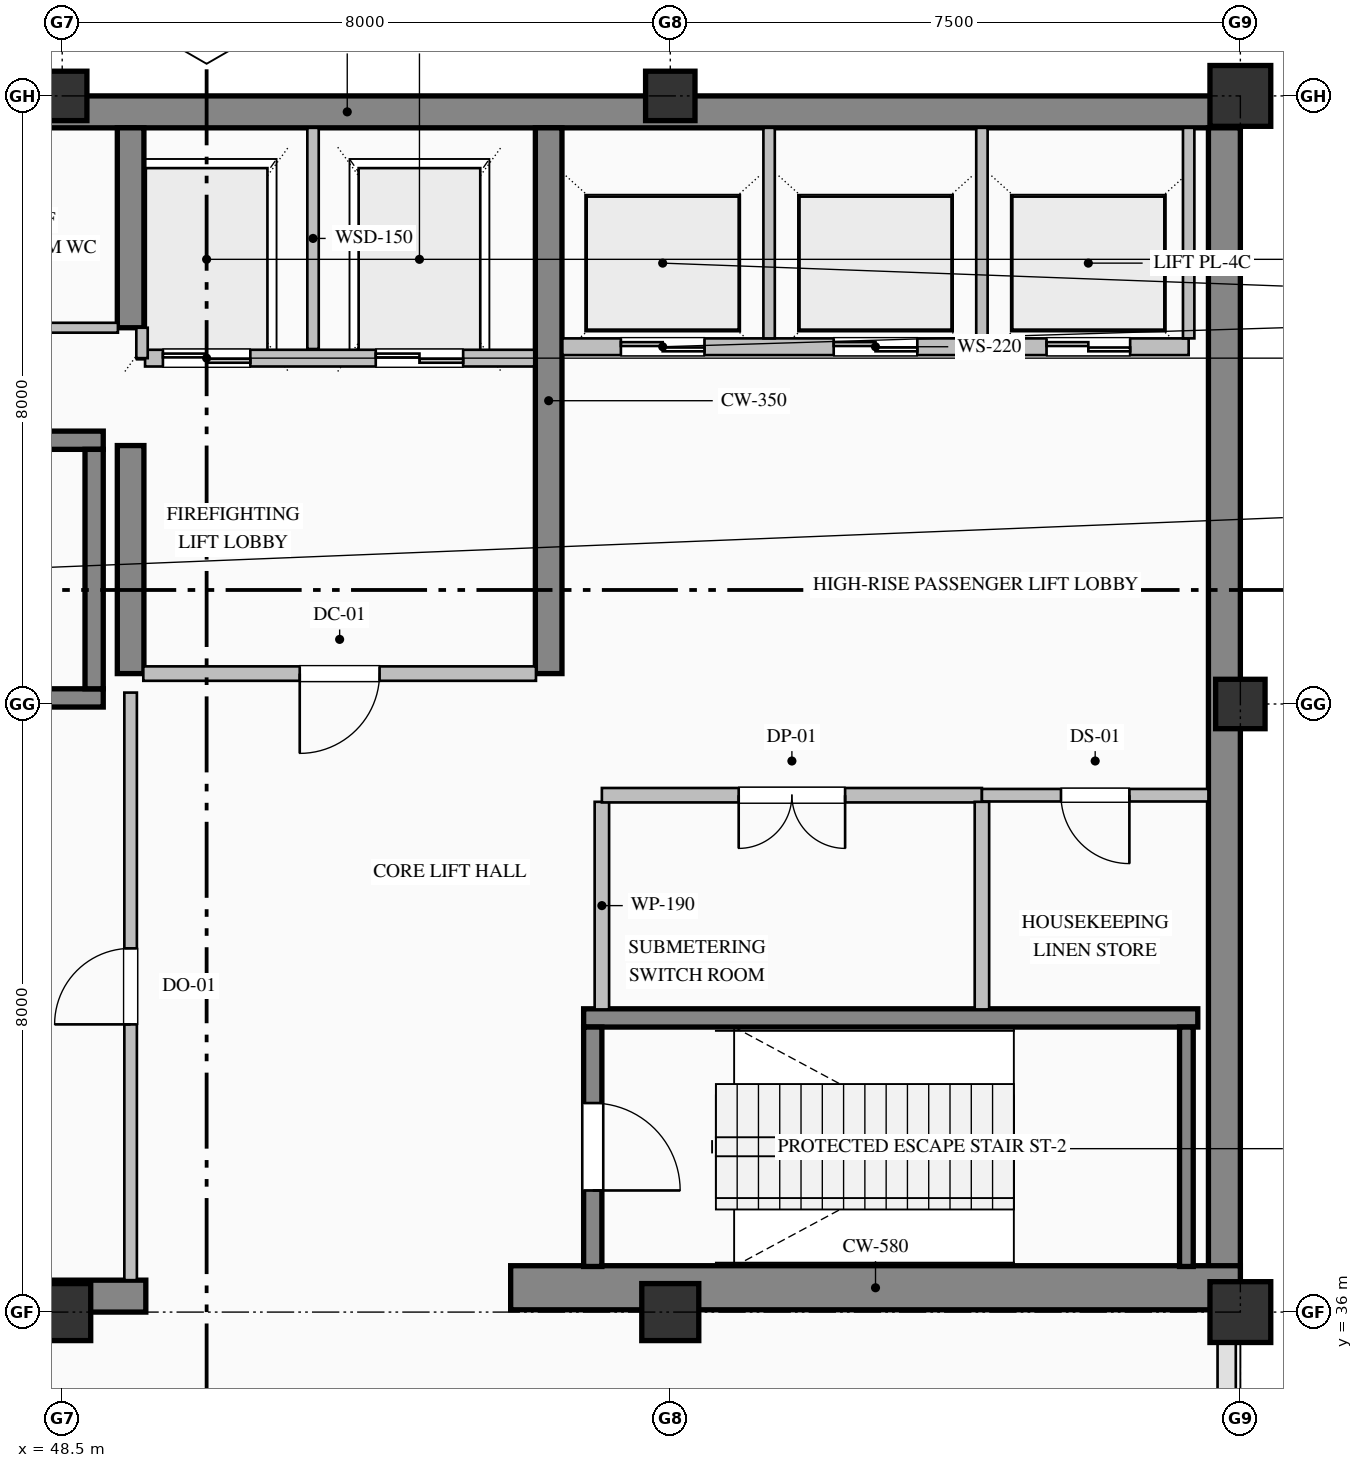
"""IFC4 building model, lengths in metres.
Left out: names, types, materials, properties, quantities, classifications, styles, units other than length and angle.
Written with IfcOpenShell. Run it as: python <this file> out.ifc"""

import sys

from ifc_helpers import new_model, si_unit, direction, frame, frame_2d, origin, origin_2d, place, context, subcontext, project, spatial, rectangle, hollow_rectangle, extrude, element, fill, save


model = new_model("IFC4")
c1 = context("Model", 3, precision=1e-05, world=origin(), true_north=direction((0.0, 1.0)))
c2 = subcontext(c1, "Body", "Model", "MODEL_VIEW")
j1 = project(units=[si_unit("LENGTHUNIT", "METRE"), si_unit("PLANEANGLEUNIT", "RADIAN")], contexts=[c1])
p1 = place(None, origin())
s1 = spatial("IfcSite", under=j1, at=p1, CompositionType="ELEMENT")
p2 = place(p1, origin())
s2 = spatial("IfcBuilding", under=s1, at=p2, CompositionType="ELEMENT")
p3 = place(p2, frame((0.0, 0.0, 378.4)))
s3 = spatial("IfcBuildingStorey", under=s2, at=p3, CompositionType="ELEMENT", Elevation=378.4)
p4 = place(p3, frame((40.5, 51.79, 0.0), z_axis=(0.0, 0.0, 1.0), x_axis=(1.0, 0.0, 0.0)))
e1 = element("IfcWall", 1, at=p4, inside=s3, PredefinedType="SHEAR", context=c2, shape_type="SweptSolid", body=[
    extrude(rectangle(XDim=23.5, YDim=0.42, at=frame_2d((11.75, 0.0))), origin(), (0.0, 0.0, 1.0), 4.95),
])
p5 = place(p3, frame((63.79, 36.32, 0.0), z_axis=(0.0, 0.0, 1.0), x_axis=(0.0, 1.0, 0.0)))
e2 = element("IfcWall", 2, at=p5, inside=s3, PredefinedType="SHEAR", context=c2, shape_type="SweptSolid", body=[
    extrude(rectangle(XDim=15.26, YDim=0.42, at=frame_2d((7.63, 0.0))), origin(), (0.0, 0.0, 1.0), 4.95),
])
p6 = place(p3, frame((40.5, 36.21, 0.0), z_axis=(0.0, 0.0, 1.0), x_axis=(1.0, 0.0, 0.0)))
e3 = element("IfcWall", 3, at=p6, inside=s3, PredefinedType="SHEAR", context=c2, shape_type="SweptSolid", body=[
    extrude(rectangle(XDim=9.1, YDim=0.42, at=frame_2d((4.55, 0.0))), origin(), (0.0, 0.0, 1.0), 4.95),
])
p7 = place(p3, frame((54.4, 36.32, 0.0), z_axis=(0.0, 0.0, 1.0), x_axis=(1.0, 0.0, 0.0)))
e4 = element("IfcWall", 4, at=p7, inside=s3, PredefinedType="SHEAR", context=c2, shape_type="SweptSolid", body=[
    extrude(rectangle(XDim=9.6, YDim=0.58, at=frame_2d((4.8, 0.0))), origin(), (0.0, 0.0, 1.0), 5.4),
])
p8 = place(p3, frame((49.4, 44.4, 0.0), z_axis=(0.0, 0.0, 1.0), x_axis=(0.0, 1.0, 0.0)))
e5 = element("IfcWall", 5, at=p8, inside=s3, PredefinedType="SHEAR", context=c2, shape_type="SweptSolid", body=[
    extrude(rectangle(XDim=3.0, YDim=0.35, at=frame_2d((1.5, 0.0))), origin(), (0.0, 0.0, 1.0), 4.95),
])
p9 = place(p3, frame((49.4, 48.95, 0.0), z_axis=(0.0, 0.0, 1.0), x_axis=(0.0, 1.0, 0.0)))
e6 = element("IfcWall", 6, at=p9, inside=s3, PredefinedType="SHEAR", context=c2, shape_type="SweptSolid", body=[
    extrude(rectangle(XDim=2.63, YDim=0.35, at=frame_2d((1.315, 0.0))), origin(), (0.0, 0.0, 1.0), 4.95),
])
p10 = place(p3, frame((54.9, 44.4, 0.0), z_axis=(0.0, 0.0, 1.0), x_axis=(0.0, 1.0, 0.0)))
e7 = element("IfcWall", 7, at=p10, inside=s3, PredefinedType="SHEAR", context=c2, shape_type="SweptSolid", body=[
    extrude(rectangle(XDim=7.18, YDim=0.35, at=frame_2d((3.59, 0.0))), origin(), (0.0, 0.0, 1.0), 4.95),
])
p11 = place(p3, frame((48.5, 36.0, 0.0), z_axis=(0.0, 0.0, 1.0), x_axis=(1.0, 0.0, 0.0)))
e8 = element("IfcColumn", 8, at=p11, inside=s3, PredefinedType="COLUMN", context=c2, shape_type="SweptSolid", body=[
    extrude(rectangle(XDim=0.75, YDim=0.75, at=origin_2d()), origin(), (0.0, 0.0, 1.0), 5.4),
])
p12 = place(p3, frame((48.5, 52.0, 0.0), z_axis=(0.0, 0.0, 1.0), x_axis=(1.0, 0.0, 0.0)))
e9 = element("IfcColumn", 9, at=p12, inside=s3, PredefinedType="COLUMN", context=c2, shape_type="SweptSolid", body=[
    extrude(hollow_rectangle(XDim=0.65, YDim=0.65, WallThickness=0.028, at=origin_2d()), origin(), (0.0, 0.0, 1.0), 5.4),
])
p13 = place(p3, frame((56.5, 36.0, 0.0), z_axis=(0.0, 0.0, 1.0), x_axis=(1.0, 0.0, 0.0)))
e10 = element("IfcColumn", 10, at=p13, inside=s3, PredefinedType="COLUMN", context=c2, shape_type="SweptSolid", body=[
    extrude(rectangle(XDim=0.75, YDim=0.75, at=origin_2d()), origin(), (0.0, 0.0, 1.0), 5.4),
])
p14 = place(p3, frame((56.5, 52.0, 0.0), z_axis=(0.0, 0.0, 1.0), x_axis=(1.0, 0.0, 0.0)))
e11 = element("IfcColumn", 11, at=p14, inside=s3, PredefinedType="COLUMN", context=c2, shape_type="SweptSolid", body=[
    extrude(hollow_rectangle(XDim=0.65, YDim=0.65, WallThickness=0.028, at=origin_2d()), origin(), (0.0, 0.0, 1.0), 5.4),
])
p15 = place(p3, frame((64.0, 36.0, 0.0), z_axis=(0.0, 0.0, 1.0), x_axis=(1.0, 0.0, 0.0)))
e12 = element("IfcColumn", 12, at=p15, inside=s3, PredefinedType="COLUMN", context=c2, shape_type="SweptSolid", body=[
    extrude(hollow_rectangle(XDim=0.8, YDim=0.8, WallThickness=0.032, at=origin_2d()), origin(), (0.0, 0.0, 1.0), 5.4),
])
p16 = place(p3, frame((64.0, 44.0, 0.0), z_axis=(0.0, 0.0, 1.0), x_axis=(1.0, 0.0, 0.0)))
e13 = element("IfcColumn", 13, at=p16, inside=s3, PredefinedType="COLUMN", context=c2, shape_type="SweptSolid", body=[
    extrude(hollow_rectangle(XDim=0.65, YDim=0.65, WallThickness=0.028, at=origin_2d()), origin(), (0.0, 0.0, 1.0), 5.4),
])
p17 = place(p3, frame((64.0, 52.0, 0.0), z_axis=(0.0, 0.0, 1.0), x_axis=(1.0, 0.0, 0.0)))
e14 = element("IfcColumn", 14, at=p17, inside=s3, PredefinedType="COLUMN", context=c2, shape_type="SweptSolid", body=[
    extrude(hollow_rectangle(XDim=0.8, YDim=0.8, WallThickness=0.032, at=origin_2d()), origin(), (0.0, 0.0, 1.0), 5.4),
])
for number, where, z_axis, x_axis in (
    (15, (40.96, 47.47, 0.0), (0.0, 0.0, 1.0), (1.0, 0.0, 0.0)),
    (16, (49.04, 44.08, 0.0), (0.0, 0.0, 1.0), (-1.0, 0.0, 0.0)),
):
    element("IfcWall", number, at=place(p3, frame(where, z_axis=z_axis, x_axis=x_axis)), inside=s3, PredefinedType="SOLIDWALL", context=c2, shape_type="SweptSolid", body=[
        extrude(rectangle(XDim=8.08, YDim=0.24, at=frame_2d((4.04, 0.0))), origin(), (0.0, 0.0, 1.0), 5.4),
    ])
p18 = place(p3, frame((48.92, 44.2, 0.0), z_axis=(0.0, 0.0, 1.0), x_axis=(0.0, 1.0, 0.0)))
e17 = element("IfcWall", 17, at=p18, inside=s3, PredefinedType="SOLIDWALL", context=c2, shape_type="SweptSolid", body=[
    extrude(rectangle(XDim=3.15, YDim=0.24, at=frame_2d((1.575, 0.0))), origin(), (0.0, 0.0, 1.0), 5.4),
])
p19 = place(p3, frame((55.36, 39.87, 0.0), z_axis=(0.0, 0.0, 1.0), x_axis=(1.0, 0.0, 0.0)))
e18 = element("IfcWall", 18, at=p19, inside=s3, PredefinedType="SOLIDWALL", context=c2, shape_type="SweptSolid", body=[
    extrude(rectangle(XDim=8.08, YDim=0.24, at=frame_2d((4.04, 0.0))), origin(), (0.0, 0.0, 1.0), 5.4),
])
p20 = place(p3, frame((55.48, 39.75, 0.0), z_axis=(0.0, 0.0, 1.0), x_axis=(0.0, -1.0, 0.0)))
e19 = element("IfcWall", 19, at=p20, inside=s3, PredefinedType="SOLIDWALL", context=c2, shape_type="SweptSolid", body=[
    extrude(rectangle(XDim=3.15, YDim=0.24, at=frame_2d((1.575, 0.0))), origin(), (0.0, 0.0, 1.0), 5.4),
])
p21 = place(p20, frame((1.0, 0.0, 0.0)))
e20 = element("IfcOpeningElement", 20, at=p21, cuts=e19, PredefinedType="OPENING", context=c2, shape_type="SweptSolid", body=[
    extrude(rectangle(XDim=1.15, YDim=2.2, at=frame_2d((0.575, 1.1))), frame((0.0, 0.13, 0.0), z_axis=(0.0, -1.0, 0.0), x_axis=(1.0, 0.0, 0.0)), (0.0, 0.0, 1.0), 0.26),
])
p22 = place(p3, frame((63.29, 36.6, 0.0), z_axis=(0.0, 0.0, 1.0), x_axis=(0.0, 1.0, 0.0)))
e21 = element("IfcWall", 21, at=p22, inside=s3, PredefinedType="SOLIDWALL", context=c2, shape_type="SweptSolid", body=[
    extrude(rectangle(XDim=3.15, YDim=0.18, at=frame_2d((1.575, 0.0))), origin(), (0.0, 0.0, 1.0), 5.4),
])
p23 = place(p3, frame((54.71, 48.55, 0.0), z_axis=(0.0, 0.0, 1.0), x_axis=(-1.0, 0.0, 0.0)))
e22 = element("IfcWall", 22, at=p23, inside=s3, PredefinedType="PARTITIONING", context=c2, shape_type="SweptSolid", body=[
    extrude(rectangle(XDim=5.12, YDim=0.22, at=frame_2d((2.56, 0.0))), origin(), (0.0, 0.0, 1.0), 4.95),
])
p24 = place(p23, frame((3.735, 0.0, 0.0)))
e23 = element("IfcOpeningElement", 23, at=p24, cuts=e22, PredefinedType="OPENING", context=c2, shape_type="SweptSolid", body=[
    extrude(rectangle(XDim=1.15, YDim=2.2, at=frame_2d((0.575, 1.1))), frame((0.0, 0.12, 0.0), z_axis=(0.0, -1.0, 0.0), x_axis=(1.0, 0.0, 0.0)), (0.0, 0.0, 1.0), 0.24),
])
p25 = place(p23, frame((0.935, 0.0, 0.0)))
e24 = element("IfcOpeningElement", 24, at=p25, cuts=e22, PredefinedType="OPENING", context=c2, shape_type="SweptSolid", body=[
    extrude(rectangle(XDim=1.15, YDim=2.2, at=frame_2d((0.575, 1.1))), frame((0.0, 0.12, 0.0), z_axis=(0.0, -1.0, 0.0), x_axis=(1.0, 0.0, 0.0)), (0.0, 0.0, 1.0), 0.24),
])
p26 = place(p3, frame((51.8, 48.67, 0.0), z_axis=(0.0, 0.0, 1.0), x_axis=(0.0, 1.0, 0.0)))
e25 = element("IfcWall", 25, at=p26, inside=s3, PredefinedType="PARTITIONING", context=c2, shape_type="SweptSolid", body=[
    extrude(rectangle(XDim=2.91, YDim=0.15, at=frame_2d((1.455, 0.0))), origin(), (0.0, 0.0, 1.0), 4.95),
])
p27 = place(p3, frame((49.55, 48.55, 0.0), z_axis=(0.0, 0.0, 1.0), x_axis=(0.0, 1.0, 0.0)))
e26 = element("IfcWall", 26, at=p27, inside=s3, PredefinedType="PARTITIONING", context=c2, shape_type="SweptSolid", body=[
    extrude(rectangle(XDim=0.4, YDim=0.15, at=frame_2d((0.2, 0.0))), origin(), (0.0, 0.0, 1.0), 4.95),
])
p28 = place(p3, frame((63.32, 48.7, 0.0), z_axis=(0.0, 0.0, 1.0), x_axis=(-1.0, 0.0, 0.0)))
e27 = element("IfcWall", 27, at=p28, inside=s3, PredefinedType="PARTITIONING", context=c2, shape_type="SweptSolid", body=[
    extrude(rectangle(XDim=8.24, YDim=0.22, at=frame_2d((4.12, 0.0))), origin(), (0.0, 0.0, 1.0), 4.95),
])
p29 = place(p28, frame((6.37, 0.0, 0.0)))
e28 = element("IfcOpeningElement", 28, at=p29, cuts=e27, PredefinedType="OPENING", context=c2, shape_type="SweptSolid", body=[
    extrude(rectangle(XDim=1.1, YDim=2.2, at=frame_2d((0.55, 1.1))), frame((0.0, 0.12, 0.0), z_axis=(0.0, -1.0, 0.0), x_axis=(1.0, 0.0, 0.0)), (0.0, 0.0, 1.0), 0.24),
])
p30 = place(p28, frame((3.57, 0.0, 0.0)))
e29 = element("IfcOpeningElement", 29, at=p30, cuts=e27, PredefinedType="OPENING", context=c2, shape_type="SweptSolid", body=[
    extrude(rectangle(XDim=1.1, YDim=2.2, at=frame_2d((0.55, 1.1))), frame((0.0, 0.12, 0.0), z_axis=(0.0, -1.0, 0.0), x_axis=(1.0, 0.0, 0.0)), (0.0, 0.0, 1.0), 0.24),
])
p31 = place(p28, frame((0.77, 0.0, 0.0)))
e30 = element("IfcOpeningElement", 30, at=p31, cuts=e27, PredefinedType="OPENING", context=c2, shape_type="SweptSolid", body=[
    extrude(rectangle(XDim=1.1, YDim=2.2, at=frame_2d((0.55, 1.1))), frame((0.0, 0.12, 0.0), z_axis=(0.0, -1.0, 0.0), x_axis=(1.0, 0.0, 0.0)), (0.0, 0.0, 1.0), 0.24),
])
for number, where, z_axis, x_axis in (
    (31, (57.8, 48.81, 0.0), (0.0, 0.0, 1.0), (0.0, 1.0, 0.0)),
    (32, (60.6, 48.81, 0.0), (0.0, 0.0, 1.0), (0.0, 1.0, 0.0)),
    (33, (63.32, 48.81, 0.0), (0.0, 0.0, 1.0), (0.0, 1.0, 0.0)),
):
    element("IfcWall", number, at=place(p3, frame(where, z_axis=z_axis, x_axis=x_axis)), inside=s3, PredefinedType="PARTITIONING", context=c2, shape_type="SweptSolid", body=[
        extrude(rectangle(XDim=2.77, YDim=0.15, at=frame_2d((1.385, 0.0))), origin(), (0.0, 0.0, 1.0), 4.95),
    ])
p32 = place(p3, frame((43.5, 48.95, 0.0), z_axis=(0.0, 0.0, 1.0), x_axis=(1.0, 0.0, 0.0)))
e34 = element("IfcWall", 34, at=p32, inside=s3, PredefinedType="PARTITIONING", context=c2, shape_type="SweptSolid", body=[
    extrude(rectangle(XDim=5.733, YDim=0.13, at=frame_2d((2.866, 0.0))), origin(), (0.0, 0.0, 1.0), 4.95),
])
p33 = place(p32, frame((2.406, 0.0, 0.0)))
e35 = element("IfcOpeningElement", 35, at=p33, cuts=e34, PredefinedType="OPENING", context=c2, shape_type="SweptSolid", body=[
    extrude(rectangle(XDim=0.92, YDim=2.15, at=frame_2d((0.46, 1.075))), frame((0.0, 0.075, 0.0), z_axis=(0.0, -1.0, 0.0), x_axis=(1.0, 0.0, 0.0)), (0.0, 0.0, 1.0), 0.15),
])
p34 = place(p3, frame((54.733, 44.4, 0.0), z_axis=(0.0, 0.0, 1.0), x_axis=(-1.0, 0.0, 0.0)))
e36 = element("IfcWall", 36, at=p34, inside=s3, PredefinedType="PARTITIONING", context=c2, shape_type="SweptSolid", body=[
    extrude(rectangle(XDim=5.166, YDim=0.19, at=frame_2d((2.583, 0.0))), origin(), (0.0, 0.0, 1.0), 4.95),
])
p35 = place(p34, frame((2.058, 0.0, 0.0)))
e37 = element("IfcOpeningElement", 37, at=p35, cuts=e36, PredefinedType="OPENING", context=c2, shape_type="SweptSolid", body=[
    extrude(rectangle(XDim=1.05, YDim=2.15, at=frame_2d((0.525, 1.075))), frame((0.0, 0.105, 0.0), z_axis=(0.0, -1.0, 0.0), x_axis=(1.0, 0.0, 0.0)), (0.0, 0.0, 1.0), 0.21),
])
p36 = place(p3, frame((49.4, 36.42, 0.0), z_axis=(0.0, 0.0, 1.0), x_axis=(0.0, 1.0, 0.0)))
e38 = element("IfcWall", 38, at=p36, inside=s3, PredefinedType="PARTITIONING", context=c2, shape_type="SweptSolid", body=[
    extrude(rectangle(XDim=7.73, YDim=0.165, at=frame_2d((3.865, 0.0))), origin(), (0.0, 0.0, 1.0), 4.192),
])
p37 = place(p36, frame((3.365, 0.0, 0.0)))
e39 = element("IfcOpeningElement", 39, at=p37, cuts=e38, PredefinedType="OPENING", context=c2, shape_type="SweptSolid", body=[
    extrude(rectangle(XDim=1.0, YDim=2.15, at=frame_2d((0.5, 1.075))), frame((0.0, 0.093, 0.0), z_axis=(0.0, -1.0, 0.0), x_axis=(1.0, 0.0, 0.0)), (0.0, 0.0, 1.0), 0.185),
])
p38 = place(p3, frame((55.6, 42.713, 0.0), z_axis=(0.0, 0.0, 1.0), x_axis=(0.0, -1.0, 0.0)))
e40 = element("IfcWall", 40, at=p38, inside=s3, PredefinedType="PARTITIONING", context=c2, shape_type="SweptSolid", body=[
    extrude(rectangle(XDim=2.731, YDim=0.19, at=frame_2d((1.365, 0.0))), origin(), (0.0, 0.0, 1.0), 4.95),
])
p39 = place(p3, frame((60.6, 42.8, 0.0), z_axis=(0.0, 0.0, 1.0), x_axis=(-1.0, 0.0, 0.0)))
e41 = element("IfcWall", 41, at=p39, inside=s3, PredefinedType="PARTITIONING", context=c2, shape_type="SweptSolid", body=[
    extrude(rectangle(XDim=5.0, YDim=0.19, at=frame_2d((2.5, 0.0))), origin(), (0.0, 0.0, 1.0), 4.95),
])
p40 = place(p39, frame((1.8, 0.0, 0.0)))
e42 = element("IfcOpeningElement", 42, at=p40, cuts=e41, PredefinedType="OPENING", context=c2, shape_type="SweptSolid", body=[
    extrude(rectangle(XDim=1.4, YDim=2.25, at=frame_2d((0.7, 1.125))), frame((0.0, 0.105, 0.0), z_axis=(0.0, -1.0, 0.0), x_axis=(1.0, 0.0, 0.0)), (0.0, 0.0, 1.0), 0.21),
])
p41 = place(p3, frame((63.58, 42.8, 0.0), z_axis=(0.0, 0.0, 1.0), x_axis=(-1.0, 0.0, 0.0)))
e43 = element("IfcWall", 43, at=p41, inside=s3, PredefinedType="PARTITIONING", context=c2, shape_type="SweptSolid", body=[
    extrude(rectangle(XDim=2.98, YDim=0.165, at=frame_2d((1.49, 0.0))), origin(), (0.0, 0.0, 1.0), 4.95),
])
p42 = place(p41, frame((1.04, 0.0, 0.0)))
e44 = element("IfcOpeningElement", 44, at=p42, cuts=e43, PredefinedType="OPENING", context=c2, shape_type="SweptSolid", body=[
    extrude(rectangle(XDim=0.9, YDim=2.15, at=frame_2d((0.45, 1.075))), frame((0.0, 0.093, 0.0), z_axis=(0.0, -1.0, 0.0), x_axis=(1.0, 0.0, 0.0)), (0.0, 0.0, 1.0), 0.185),
])
p43 = place(p3, frame((60.6, 42.713, 0.0), z_axis=(0.0, 0.0, 1.0), x_axis=(0.0, -1.0, 0.0)))
e45 = element("IfcWall", 45, at=p43, inside=s3, PredefinedType="PARTITIONING", context=c2, shape_type="SweptSolid", body=[
    extrude(rectangle(XDim=2.731, YDim=0.19, at=frame_2d((1.365, 0.0))), origin(), (0.0, 0.0, 1.0), 4.95),
])
p44 = place(p21, origin())
e46 = element("IfcDoor", 46, at=p44, inside=s3, OperationType="SINGLE_SWING_RIGHT", PredefinedType="DOOR", context=c2, shape_type="SweptSolid", body=[
    extrude(rectangle(XDim=1.15, YDim=2.2, at=frame_2d((0.575, 1.1))), frame((0.0, 0.025, 0.0), z_axis=(0.0, -1.0, 0.0), x_axis=(1.0, 0.0, 0.0)), (0.0, 0.0, 1.0), 0.05),
])
fill(e20, e46)
p45 = place(p24, origin())
e47 = element("IfcDoor", 47, at=p45, inside=s3, OperationType="DOUBLE_DOOR_SLIDING", PredefinedType="DOOR", context=c2, shape_type="SweptSolid", body=[
    extrude(rectangle(XDim=1.15, YDim=2.2, at=frame_2d((0.575, 1.1))), frame((0.0, 0.025, 0.0), z_axis=(0.0, -1.0, 0.0), x_axis=(1.0, 0.0, 0.0)), (0.0, 0.0, 1.0), 0.05),
])
fill(e23, e47)
p46 = place(p25, origin())
e48 = element("IfcDoor", 48, at=p46, inside=s3, OperationType="DOUBLE_DOOR_SLIDING", PredefinedType="DOOR", context=c2, shape_type="SweptSolid", body=[
    extrude(rectangle(XDim=1.15, YDim=2.2, at=frame_2d((0.575, 1.1))), frame((0.0, 0.025, 0.0), z_axis=(0.0, -1.0, 0.0), x_axis=(1.0, 0.0, 0.0)), (0.0, 0.0, 1.0), 0.05),
])
fill(e24, e48)
p47 = place(p29, origin())
e49 = element("IfcDoor", 49, at=p47, inside=s3, OperationType="DOUBLE_DOOR_SLIDING", PredefinedType="DOOR", context=c2, shape_type="SweptSolid", body=[
    extrude(rectangle(XDim=1.1, YDim=2.2, at=frame_2d((0.55, 1.1))), frame((0.0, 0.025, 0.0), z_axis=(0.0, -1.0, 0.0), x_axis=(1.0, 0.0, 0.0)), (0.0, 0.0, 1.0), 0.05),
])
fill(e28, e49)
p48 = place(p30, origin())
e50 = element("IfcDoor", 50, at=p48, inside=s3, OperationType="DOUBLE_DOOR_SLIDING", PredefinedType="DOOR", context=c2, shape_type="SweptSolid", body=[
    extrude(rectangle(XDim=1.1, YDim=2.2, at=frame_2d((0.55, 1.1))), frame((0.0, 0.025, 0.0), z_axis=(0.0, -1.0, 0.0), x_axis=(1.0, 0.0, 0.0)), (0.0, 0.0, 1.0), 0.05),
])
fill(e29, e50)
p49 = place(p31, origin())
e51 = element("IfcDoor", 51, at=p49, inside=s3, OperationType="DOUBLE_DOOR_SLIDING", PredefinedType="DOOR", context=c2, shape_type="SweptSolid", body=[
    extrude(rectangle(XDim=1.1, YDim=2.2, at=frame_2d((0.55, 1.1))), frame((0.0, 0.025, 0.0), z_axis=(0.0, -1.0, 0.0), x_axis=(1.0, 0.0, 0.0)), (0.0, 0.0, 1.0), 0.05),
])
fill(e30, e51)
p50 = place(p35, origin())
e52 = element("IfcDoor", 52, at=p50, inside=s3, OperationType="SINGLE_SWING_RIGHT", PredefinedType="DOOR", context=c2, shape_type="SweptSolid", body=[
    extrude(rectangle(XDim=1.05, YDim=2.15, at=frame_2d((0.525, 1.075))), frame((0.0, 0.025, 0.0), z_axis=(0.0, -1.0, 0.0), x_axis=(1.0, 0.0, 0.0)), (0.0, 0.0, 1.0), 0.05),
])
fill(e37, e52)
p51 = place(p37, origin())
e53 = element("IfcDoor", 53, at=p51, inside=s3, OperationType="SINGLE_SWING_LEFT", PredefinedType="DOOR", context=c2, shape_type="SweptSolid", body=[
    extrude(rectangle(XDim=1.0, YDim=2.15, at=frame_2d((0.5, 1.075))), frame((0.0, 0.025, 0.0), z_axis=(0.0, -1.0, 0.0), x_axis=(1.0, 0.0, 0.0)), (0.0, 0.0, 1.0), 0.05),
])
fill(e39, e53)
p52 = place(p40, origin())
e54 = element("IfcDoor", 54, at=p52, inside=s3, OperationType="DOUBLE_DOOR_SINGLE_SWING", PredefinedType="DOOR", context=c2, shape_type="SweptSolid", body=[
    extrude(rectangle(XDim=1.4, YDim=2.25, at=frame_2d((0.7, 1.125))), frame((0.0, 0.025, 0.0), z_axis=(0.0, -1.0, 0.0), x_axis=(1.0, 0.0, 0.0)), (0.0, 0.0, 1.0), 0.05),
])
fill(e42, e54)
p53 = place(p42, origin())
e55 = element("IfcDoor", 55, at=p53, inside=s3, OperationType="SINGLE_SWING_LEFT", PredefinedType="DOOR", context=c2, shape_type="SweptSolid", body=[
    extrude(rectangle(XDim=0.9, YDim=2.15, at=frame_2d((0.45, 1.075))), frame((0.0, 0.025, 0.0), z_axis=(0.0, -1.0, 0.0), x_axis=(1.0, 0.0, 0.0)), (0.0, 0.0, 1.0), 0.05),
])
fill(e44, e55)
save(model, sys.argv[1])
